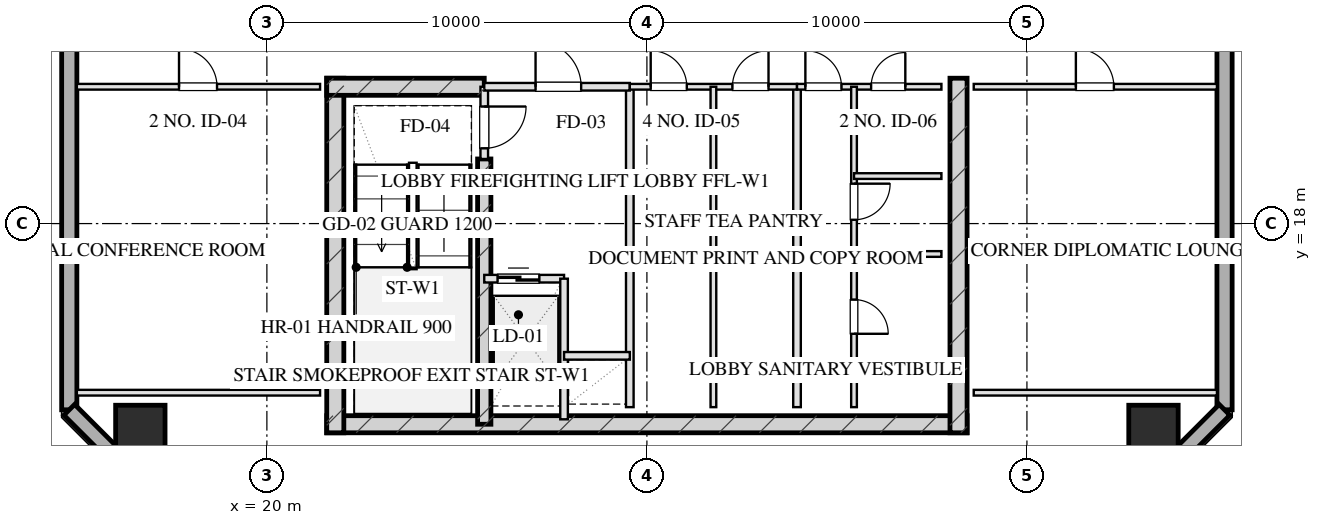
"""IFC4 building model, lengths in metres.
Left out: names, types, materials, properties, quantities, classifications, styles, units other than length and angle.
Written with IfcOpenShell. Run it as: python <this file> out.ifc"""

import sys

from ifc_helpers import new_model, si_unit, direction, frame, frame_2d, origin, origin_2d, place, context, subcontext, project, spatial, rectangle, hollow_rectangle, extrude, element, fill, save


model = new_model("IFC4")
c1 = context("Model", 3, precision=1e-05, world=origin(), true_north=direction((0.0, 1.0)))
c2 = subcontext(c1, "Body", "Model", "MODEL_VIEW")
j1 = project(units=[si_unit("LENGTHUNIT", "METRE"), si_unit("PLANEANGLEUNIT", "RADIAN")], contexts=[c1])
p1 = place(None, origin())
s1 = spatial("IfcSite", under=j1, at=p1, CompositionType="ELEMENT")
p2 = place(p1, origin())
s2 = spatial("IfcBuilding", under=s1, at=p2, CompositionType="ELEMENT")
p3 = place(p2, frame((0.0, 0.0, 240.8)))
s3 = spatial("IfcBuildingStorey", under=s2, at=p3, CompositionType="ELEMENT", Elevation=240.8)
p4 = place(p3, frame((21.575, 12.72, 0.0), z_axis=(0.0, 0.0, 1.0), x_axis=(1.0, 0.0, 0.0)))
e1 = element("IfcWall", 1, at=p4, inside=s3, PredefinedType="SHEAR", context=c2, shape_type="SweptSolid", body=[
    extrude(rectangle(XDim=16.85, YDim=0.45, at=frame_2d((8.425, 0.0))), origin(), (0.0, 0.0, 1.0), 3.2),
])
for number, where, z_axis, x_axis in (
    (2, (21.8, 21.825, 0.0), (0.0, 0.0, 1.0), (0.0, -1.0, 0.0)),
    (3, (38.2, 21.825, 0.0), (0.0, 0.0, 1.0), (0.0, -1.0, 0.0)),
):
    element("IfcWall", number, at=place(p3, frame(where, z_axis=z_axis, x_axis=x_axis)), inside=s3, PredefinedType="SHEAR", context=c2, shape_type="SweptSolid", body=[
        extrude(rectangle(XDim=9.33, YDim=0.45, at=frame_2d((4.665, 0.0))), origin(), (0.0, 0.0, 1.0), 3.2),
    ])
p5 = place(p3, frame((25.72, 19.7, 0.0), z_axis=(0.0, 0.0, 1.0), x_axis=(0.0, -1.0, 0.0)))
e4 = element("IfcWall", 4, at=p5, inside=s3, PredefinedType="SHEAR", context=c2, shape_type="SweptSolid", body=[
    extrude(rectangle(XDim=6.98, YDim=0.35, at=frame_2d((3.49, 0.0))), origin(), (0.0, 0.0, 1.0), 3.2),
])
p6 = place(p3, frame((21.575, 21.6, 0.0), z_axis=(0.0, 0.0, 1.0), x_axis=(1.0, 0.0, 0.0)))
e5 = element("IfcWall", 5, at=p6, inside=s3, PredefinedType="SHEAR", context=c2, shape_type="SweptSolid", body=[
    extrude(rectangle(XDim=4.145, YDim=0.45, at=frame_2d((2.073, 0.0))), origin(), (0.0, 0.0, 1.0), 3.2),
])
for number, where, z_axis, x_axis in (
    (6, (16.67, 12.57, 0.0), (0.0, 0.0, 1.0), (1.0, 0.0, 0.0)),
    (7, (43.33, 12.57, 0.0), (0.0, 0.0, 1.0), (1.0, 0.0, 0.0)),
):
    element("IfcColumn", number, at=place(p3, frame(where, z_axis=z_axis, x_axis=x_axis)), inside=s3, PredefinedType="COLUMN", context=c2, shape_type="SweptSolid", body=[
        extrude(hollow_rectangle(XDim=1.3, YDim=1.3, WallThickness=0.045, at=origin_2d()), origin(), (0.0, 0.0, 1.0), 3.201),
    ])
p7 = place(p3, frame((14.8, 13.1, 0.0), z_axis=(0.0, 0.0, 1.0), x_axis=(0.0, 1.0, 0.0)))
e8 = element("IfcWall", 8, at=p7, inside=s3, PredefinedType="SOLIDWALL", context=c2, shape_type="SweptSolid", body=[
    extrude(rectangle(XDim=41.8, YDim=0.4, at=frame_2d((20.9, 0.0))), origin(), (0.0, 0.0, 1.0), 2.36),
])
p8 = place(p7, frame((13.525, 0.0, 0.75)))
e9 = element("IfcOpeningElement", 9, at=p8, cuts=e8, PredefinedType="OPENING", context=c2, shape_type="SweptSolid", body=[
    extrude(rectangle(XDim=1.95, YDim=1.21, at=frame_2d((0.975, 0.605))), frame((0.0, 0.21, 0.0), z_axis=(0.0, -1.0, 0.0), x_axis=(1.0, 0.0, 0.0)), (0.0, 0.0, 1.0), 0.42),
])
p9 = place(p7, frame((17.325, 0.0, 0.75)))
e10 = element("IfcOpeningElement", 10, at=p9, cuts=e8, PredefinedType="OPENING", context=c2, shape_type="SweptSolid", body=[
    extrude(rectangle(XDim=1.95, YDim=1.21, at=frame_2d((0.975, 0.605))), frame((0.0, 0.21, 0.0), z_axis=(0.0, -1.0, 0.0), x_axis=(1.0, 0.0, 0.0)), (0.0, 0.0, 1.0), 0.42),
])
p10 = place(p7, frame((23.2, 0.0, 0.0)))
e11 = element("IfcOpeningElement", 11, at=p10, cuts=e8, PredefinedType="OPENING", context=c2, shape_type="SweptSolid", body=[
    extrude(rectangle(XDim=1.1, YDim=2.15, at=frame_2d((0.55, 1.075))), frame((0.0, 0.21, 0.0), z_axis=(0.0, -1.0, 0.0), x_axis=(1.0, 0.0, 0.0)), (0.0, 0.0, 1.0), 0.42),
])
p11 = place(p3, frame((45.2, 54.9, 0.0), z_axis=(0.0, 0.0, 1.0), x_axis=(0.0, -1.0, 0.0)))
e12 = element("IfcWall", 12, at=p11, inside=s3, PredefinedType="SOLIDWALL", context=c2, shape_type="SweptSolid", body=[
    extrude(rectangle(XDim=41.8, YDim=0.4, at=frame_2d((20.9, 0.0))), origin(), (0.0, 0.0, 1.0), 2.36),
])
p12 = place(p11, frame((26.325, 0.0, 0.75)))
e13 = element("IfcOpeningElement", 13, at=p12, cuts=e12, PredefinedType="OPENING", context=c2, shape_type="SweptSolid", body=[
    extrude(rectangle(XDim=1.95, YDim=1.21, at=frame_2d((0.975, 0.605))), frame((0.0, 0.21, 0.0), z_axis=(0.0, -1.0, 0.0), x_axis=(1.0, 0.0, 0.0)), (0.0, 0.0, 1.0), 0.42),
])
p13 = place(p11, frame((22.525, 0.0, 0.75)))
e14 = element("IfcOpeningElement", 14, at=p13, cuts=e12, PredefinedType="OPENING", context=c2, shape_type="SweptSolid", body=[
    extrude(rectangle(XDim=1.95, YDim=1.21, at=frame_2d((0.975, 0.605))), frame((0.0, 0.21, 0.0), z_axis=(0.0, -1.0, 0.0), x_axis=(1.0, 0.0, 0.0)), (0.0, 0.0, 1.0), 0.42),
])
p14 = place(p11, frame((17.5, 0.0, 0.0)))
e15 = element("IfcOpeningElement", 15, at=p14, cuts=e12, PredefinedType="OPENING", context=c2, shape_type="SweptSolid", body=[
    extrude(rectangle(XDim=1.1, YDim=2.15, at=frame_2d((0.55, 1.075))), frame((0.0, 0.21, 0.0), z_axis=(0.0, -1.0, 0.0), x_axis=(1.0, 0.0, 0.0)), (0.0, 0.0, 1.0), 0.42),
])
for number, where, z_axis, x_axis in (
    (16, (45.2, 13.1, 0.0), (0.0, 0.0, 1.0), (-0.707, -0.707, 0.0)),
    (17, (17.2, 10.7, 0.0), (0.0, 0.0, 1.0), (-0.707, 0.707, 0.0)),
):
    element("IfcWall", number, at=place(p3, frame(where, z_axis=z_axis, x_axis=x_axis)), inside=s3, PredefinedType="SOLIDWALL", context=c2, shape_type="SweptSolid", body=[
        extrude(rectangle(XDim=3.394, YDim=0.4, at=frame_2d((1.697, 0.0))), origin(), (0.0, 0.0, 1.0), 2.36),
    ])
p15 = place(p3, frame((25.72, 21.6, 0.0), z_axis=(0.0, 0.0, 1.0), x_axis=(0.0, -1.0, 0.0)))
e18 = element("IfcWall", 18, at=p15, inside=s3, PredefinedType="PARTITIONING", context=c2, shape_type="SweptSolid", body=[
    extrude(rectangle(XDim=1.9, YDim=0.2, at=frame_2d((0.95, 0.0))), origin(), (0.0, 0.0, 1.0), 2.925),
])
p16 = place(p15, frame((0.52, 0.0, 0.0)))
e19 = element("IfcOpeningElement", 19, at=p16, cuts=e18, PredefinedType="OPENING", context=c2, shape_type="SweptSolid", body=[
    extrude(rectangle(XDim=1.1, YDim=2.05, at=frame_2d((0.55, 1.025))), frame((0.0, 0.11, 0.0), z_axis=(0.0, -1.0, 0.0), x_axis=(1.0, 0.0, 0.0)), (0.0, 0.0, 1.0), 0.22),
])
p17 = place(p3, frame((29.55, 21.6, 0.0), z_axis=(0.0, 0.0, 1.0), x_axis=(0.0, -1.0, 0.0)))
e20 = element("IfcWall", 20, at=p17, inside=s3, PredefinedType="PARTITIONING", context=c2, shape_type="SweptSolid", body=[
    extrude(rectangle(XDim=8.43, YDim=0.2, at=frame_2d((4.215, 0.0))), origin(), (0.0, 0.0, 1.0), 2.925),
])
p18 = place(p3, frame((25.72, 21.6, 0.0), z_axis=(0.0, 0.0, 1.0), x_axis=(1.0, 0.0, 0.0)))
e21 = element("IfcWall", 21, at=p18, inside=s3, PredefinedType="PARTITIONING", context=c2, shape_type="SweptSolid", body=[
    extrude(rectangle(XDim=3.83, YDim=0.2, at=frame_2d((1.915, 0.0))), origin(), (0.0, 0.0, 1.0), 2.925),
])
p19 = place(p18, frame((1.35, 0.0, 0.0)))
e22 = element("IfcOpeningElement", 22, at=p19, cuts=e21, PredefinedType="OPENING", context=c2, shape_type="SweptSolid", body=[
    extrude(rectangle(XDim=1.2, YDim=2.05, at=frame_2d((0.6, 1.025))), frame((0.0, 0.11, 0.0), z_axis=(0.0, -1.0, 0.0), x_axis=(1.0, 0.0, 0.0)), (0.0, 0.0, 1.0), 0.22),
])
p20 = place(p3, frame((25.72, 16.55, 0.0), z_axis=(0.0, 0.0, 1.0), x_axis=(1.0, 0.0, 0.0)))
e23 = element("IfcWall", 23, at=p20, inside=s3, PredefinedType="PARTITIONING", context=c2, shape_type="SweptSolid", body=[
    extrude(rectangle(XDim=2.1, YDim=0.2, at=frame_2d((1.05, 0.0))), origin(), (0.0, 0.0, 1.0), 2.925),
])
p21 = place(p20, frame((0.35, 0.0, 0.0)))
e24 = element("IfcOpeningElement", 24, at=p21, cuts=e23, PredefinedType="OPENING", context=c2, shape_type="SweptSolid", body=[
    extrude(rectangle(XDim=1.1, YDim=2.05, at=frame_2d((0.55, 1.025))), frame((0.0, 0.11, 0.0), z_axis=(0.0, -1.0, 0.0), x_axis=(1.0, 0.0, 0.0)), (0.0, 0.0, 1.0), 0.22),
])
p22 = place(p3, frame((27.82, 16.55, 0.0), z_axis=(0.0, 0.0, 1.0), x_axis=(0.0, -1.0, 0.0)))
e25 = element("IfcWall", 25, at=p22, inside=s3, PredefinedType="PARTITIONING", context=c2, shape_type="SweptSolid", body=[
    extrude(rectangle(XDim=3.7, YDim=0.2, at=frame_2d((1.85, 0.0))), origin(), (0.0, 0.0, 1.0), 2.925),
])
p23 = place(p3, frame((27.82, 14.52, 0.0), z_axis=(0.0, 0.0, 1.0), x_axis=(1.0, 0.0, 0.0)))
e26 = element("IfcWall", 26, at=p23, inside=s3, PredefinedType="PARTITIONING", context=c2, shape_type="SweptSolid", body=[
    extrude(rectangle(XDim=1.73, YDim=0.2, at=frame_2d((0.865, 0.0))), origin(), (0.0, 0.0, 1.0), 2.925),
])
p24 = place(p3, frame((33.95, 21.6, 0.0), z_axis=(0.0, 0.0, 1.0), x_axis=(0.0, -1.0, 0.0)))
e27 = element("IfcWall", 27, at=p24, inside=s3, PredefinedType="PARTITIONING", context=c2, shape_type="SweptSolid", body=[
    extrude(rectangle(XDim=8.43, YDim=0.2, at=frame_2d((4.215, 0.0))), origin(), (0.0, 0.0, 1.0), 2.925),
])
p25 = place(p3, frame((29.55, 21.6, 0.0), z_axis=(0.0, 0.0, 1.0), x_axis=(1.0, 0.0, 0.0)))
e28 = element("IfcWall", 28, at=p25, inside=s3, PredefinedType="PARTITIONING", context=c2, shape_type="SweptSolid", body=[
    extrude(rectangle(XDim=4.4, YDim=0.15, at=frame_2d((2.2, 0.0))), origin(), (0.0, 0.0, 1.0), 2.925),
])
p26 = place(p25, frame((0.55, 0.0, 0.0)))
e29 = element("IfcOpeningElement", 29, at=p26, cuts=e28, PredefinedType="OPENING", context=c2, shape_type="SweptSolid", body=[
    extrude(rectangle(XDim=0.95, YDim=2.05, at=frame_2d((0.475, 1.025))), frame((0.0, 0.085, 0.0), z_axis=(0.0, -1.0, 0.0), x_axis=(1.0, 0.0, 0.0)), (0.0, 0.0, 1.0), 0.17),
])
p27 = place(p25, frame((2.7, 0.0, 0.0)))
e30 = element("IfcOpeningElement", 30, at=p27, cuts=e28, PredefinedType="OPENING", context=c2, shape_type="SweptSolid", body=[
    extrude(rectangle(XDim=0.95, YDim=2.05, at=frame_2d((0.475, 1.025))), frame((0.0, 0.085, 0.0), z_axis=(0.0, -1.0, 0.0), x_axis=(1.0, 0.0, 0.0)), (0.0, 0.0, 1.0), 0.17),
])
p28 = place(p3, frame((31.75, 21.6, 0.0), z_axis=(0.0, 0.0, 1.0), x_axis=(0.0, -1.0, 0.0)))
e31 = element("IfcWall", 31, at=p28, inside=s3, PredefinedType="PARTITIONING", context=c2, shape_type="SweptSolid", body=[
    extrude(rectangle(XDim=8.43, YDim=0.15, at=frame_2d((4.215, 0.0))), origin(), (0.0, 0.0, 1.0), 2.925),
])
p29 = place(p3, frame((33.95, 21.6, 0.0), z_axis=(0.0, 0.0, 1.0), x_axis=(1.0, 0.0, 0.0)))
e32 = element("IfcWall", 32, at=p29, inside=s3, PredefinedType="PARTITIONING", context=c2, shape_type="SweptSolid", body=[
    extrude(rectangle(XDim=3.8, YDim=0.15, at=frame_2d((1.9, 0.0))), origin(), (0.0, 0.0, 1.0), 2.925),
])
p30 = place(p29, frame((0.22, 0.0, 0.0)))
e33 = element("IfcOpeningElement", 33, at=p30, cuts=e32, PredefinedType="OPENING", context=c2, shape_type="SweptSolid", body=[
    extrude(rectangle(XDim=0.95, YDim=2.05, at=frame_2d((0.475, 1.025))), frame((0.0, 0.085, 0.0), z_axis=(0.0, -1.0, 0.0), x_axis=(1.0, 0.0, 0.0)), (0.0, 0.0, 1.0), 0.17),
])
p31 = place(p29, frame((1.95, 0.0, 0.0)))
e34 = element("IfcOpeningElement", 34, at=p31, cuts=e32, PredefinedType="OPENING", context=c2, shape_type="SweptSolid", body=[
    extrude(rectangle(XDim=0.9, YDim=2.05, at=frame_2d((0.45, 1.025))), frame((0.0, 0.085, 0.0), z_axis=(0.0, -1.0, 0.0), x_axis=(1.0, 0.0, 0.0)), (0.0, 0.0, 1.0), 0.17),
])
p32 = place(p3, frame((35.45, 21.6, 0.0), z_axis=(0.0, 0.0, 1.0), x_axis=(0.0, -1.0, 0.0)))
e35 = element("IfcWall", 35, at=p32, inside=s3, PredefinedType="PARTITIONING", context=c2, shape_type="SweptSolid", body=[
    extrude(rectangle(XDim=8.43, YDim=0.15, at=frame_2d((4.215, 0.0))), origin(), (0.0, 0.0, 1.0), 2.565),
])
p33 = place(p32, frame((2.55, 0.0, 0.0)))
e36 = element("IfcOpeningElement", 36, at=p33, cuts=e35, PredefinedType="OPENING", context=c2, shape_type="SweptSolid", body=[
    extrude(rectangle(XDim=0.95, YDim=2.05, at=frame_2d((0.475, 1.025))), frame((0.0, 0.085, 0.0), z_axis=(0.0, -1.0, 0.0), x_axis=(1.0, 0.0, 0.0)), (0.0, 0.0, 1.0), 0.17),
])
p34 = place(p32, frame((5.6, 0.0, 0.0)))
e37 = element("IfcOpeningElement", 37, at=p34, cuts=e35, PredefinedType="OPENING", context=c2, shape_type="SweptSolid", body=[
    extrude(rectangle(XDim=0.9, YDim=2.05, at=frame_2d((0.45, 1.025))), frame((0.0, 0.085, 0.0), z_axis=(0.0, -1.0, 0.0), x_axis=(1.0, 0.0, 0.0)), (0.0, 0.0, 1.0), 0.17),
])
for number, where, z_axis, x_axis in (
    (38, (35.45, 17.2, 0.0), (0.0, 0.0, 1.0), (1.0, 0.0, 0.0)),
    (39, (35.45, 19.25, 0.0), (0.0, 0.0, 1.0), (1.0, 0.0, 0.0)),
):
    element("IfcWall", number, at=place(p3, frame(where, z_axis=z_axis, x_axis=x_axis)), inside=s3, PredefinedType="PARTITIONING", context=c2, shape_type="SweptSolid", body=[
        extrude(rectangle(XDim=2.3, YDim=0.15, at=frame_2d((1.15, 0.0))), origin(), (0.0, 0.0, 1.0), 2.925),
    ])
p35 = place(p3, frame((15.0, 13.55, 0.0), z_axis=(0.0, 0.0, 1.0), x_axis=(1.0, 0.0, 0.0)))
e40 = element("IfcWall", 40, at=p35, inside=s3, PredefinedType="PARTITIONING", context=c2, shape_type="SweptSolid", body=[
    extrude(rectangle(XDim=6.4, YDim=0.15, at=frame_2d((3.2, 0.0))), origin(), (0.0, 0.0, 1.0), 2.925),
])
p36 = place(p3, frame((15.0, 21.6, 0.0), z_axis=(0.0, 0.0, 1.0), x_axis=(1.0, 0.0, 0.0)))
e41 = element("IfcWall", 41, at=p36, inside=s3, PredefinedType="PARTITIONING", context=c2, shape_type="SweptSolid", body=[
    extrude(rectangle(XDim=6.4, YDim=0.15, at=frame_2d((3.2, 0.0))), origin(), (0.0, 0.0, 1.0), 2.925),
])
p37 = place(p36, frame((2.688, 0.0, 0.0)))
e42 = element("IfcOpeningElement", 42, at=p37, cuts=e41, PredefinedType="OPENING", context=c2, shape_type="SweptSolid", body=[
    extrude(rectangle(XDim=1.0, YDim=2.05, at=frame_2d((0.5, 1.025))), frame((0.0, 0.085, 0.0), z_axis=(0.0, -1.0, 0.0), x_axis=(1.0, 0.0, 0.0)), (0.0, 0.0, 1.0), 0.17),
])
p38 = place(p3, frame((38.6, 13.55, 0.0), z_axis=(0.0, 0.0, 1.0), x_axis=(1.0, 0.0, 0.0)))
e43 = element("IfcWall", 43, at=p38, inside=s3, PredefinedType="PARTITIONING", context=c2, shape_type="SweptSolid", body=[
    extrude(rectangle(XDim=6.4, YDim=0.15, at=frame_2d((3.2, 0.0))), origin(), (0.0, 0.0, 1.0), 2.925),
])
p39 = place(p3, frame((38.6, 21.6, 0.0), z_axis=(0.0, 0.0, 1.0), x_axis=(1.0, 0.0, 0.0)))
e44 = element("IfcWall", 44, at=p39, inside=s3, PredefinedType="PARTITIONING", context=c2, shape_type="SweptSolid", body=[
    extrude(rectangle(XDim=6.4, YDim=0.15, at=frame_2d((3.2, 0.0))), origin(), (0.0, 0.0, 1.0), 2.925),
])
p40 = place(p39, frame((2.688, 0.0, 0.0)))
e45 = element("IfcOpeningElement", 45, at=p40, cuts=e44, PredefinedType="OPENING", context=c2, shape_type="SweptSolid", body=[
    extrude(rectangle(XDim=1.0, YDim=2.05, at=frame_2d((0.5, 1.025))), frame((0.0, 0.085, 0.0), z_axis=(0.0, -1.0, 0.0), x_axis=(1.0, 0.0, 0.0)), (0.0, 0.0, 1.0), 0.17),
])
p41 = place(p16, origin())
e46 = element("IfcDoor", 46, at=p41, inside=s3, OperationType="SINGLE_SWING_LEFT", PredefinedType="DOOR", context=c2, shape_type="SweptSolid", body=[
    extrude(rectangle(XDim=1.1, YDim=2.05, at=frame_2d((0.55, 1.025))), frame((0.0, 0.025, 0.0), z_axis=(0.0, -1.0, 0.0), x_axis=(1.0, 0.0, 0.0)), (0.0, 0.0, 1.0), 0.05),
])
fill(e19, e46)
p42 = place(p19, origin())
e47 = element("IfcDoor", 47, at=p42, inside=s3, OperationType="SINGLE_SWING_LEFT", PredefinedType="DOOR", context=c2, shape_type="SweptSolid", body=[
    extrude(rectangle(XDim=1.2, YDim=2.05, at=frame_2d((0.6, 1.025))), frame((0.0, 0.025, 0.0), z_axis=(0.0, -1.0, 0.0), x_axis=(1.0, 0.0, 0.0)), (0.0, 0.0, 1.0), 0.05),
])
fill(e22, e47)
p43 = place(p21, origin())
e48 = element("IfcDoor", 48, at=p43, inside=s3, OperationType="DOUBLE_DOOR_SLIDING", PredefinedType="DOOR", context=c2, shape_type="SweptSolid", body=[
    extrude(rectangle(XDim=1.1, YDim=2.05, at=frame_2d((0.55, 1.025))), frame((0.0, 0.025, 0.0), z_axis=(0.0, -1.0, 0.0), x_axis=(1.0, 0.0, 0.0)), (0.0, 0.0, 1.0), 0.05),
])
fill(e24, e48)
p44 = place(p26, origin())
e49 = element("IfcDoor", 49, at=p44, inside=s3, OperationType="SINGLE_SWING_LEFT", PredefinedType="DOOR", context=c2, shape_type="SweptSolid", body=[
    extrude(rectangle(XDim=0.95, YDim=2.05, at=frame_2d((0.475, 1.025))), frame((0.0, 0.025, 0.0), z_axis=(0.0, -1.0, 0.0), x_axis=(1.0, 0.0, 0.0)), (0.0, 0.0, 1.0), 0.05),
])
fill(e29, e49)
p45 = place(p27, origin())
e50 = element("IfcDoor", 50, at=p45, inside=s3, OperationType="SINGLE_SWING_RIGHT", PredefinedType="DOOR", context=c2, shape_type="SweptSolid", body=[
    extrude(rectangle(XDim=0.95, YDim=2.05, at=frame_2d((0.475, 1.025))), frame((0.0, 0.025, 0.0), z_axis=(0.0, -1.0, 0.0), x_axis=(1.0, 0.0, 0.0)), (0.0, 0.0, 1.0), 0.05),
])
fill(e30, e50)
p46 = place(p30, origin())
e51 = element("IfcDoor", 51, at=p46, inside=s3, OperationType="SINGLE_SWING_LEFT", PredefinedType="DOOR", context=c2, shape_type="SweptSolid", body=[
    extrude(rectangle(XDim=0.95, YDim=2.05, at=frame_2d((0.475, 1.025))), frame((0.0, 0.025, 0.0), z_axis=(0.0, -1.0, 0.0), x_axis=(1.0, 0.0, 0.0)), (0.0, 0.0, 1.0), 0.05),
])
fill(e33, e51)
p47 = place(p31, origin())
e52 = element("IfcDoor", 52, at=p47, inside=s3, OperationType="SINGLE_SWING_RIGHT", PredefinedType="DOOR", context=c2, shape_type="SweptSolid", body=[
    extrude(rectangle(XDim=0.9, YDim=2.05, at=frame_2d((0.45, 1.025))), frame((0.0, 0.025, 0.0), z_axis=(0.0, -1.0, 0.0), x_axis=(1.0, 0.0, 0.0)), (0.0, 0.0, 1.0), 0.05),
])
fill(e34, e52)
p48 = place(p33, origin())
e53 = element("IfcDoor", 53, at=p48, inside=s3, OperationType="SINGLE_SWING_LEFT", PredefinedType="DOOR", context=c2, shape_type="SweptSolid", body=[
    extrude(rectangle(XDim=0.95, YDim=2.05, at=frame_2d((0.475, 1.025))), frame((0.0, 0.025, 0.0), z_axis=(0.0, -1.0, 0.0), x_axis=(1.0, 0.0, 0.0)), (0.0, 0.0, 1.0), 0.05),
])
fill(e36, e53)
p49 = place(p34, origin())
e54 = element("IfcDoor", 54, at=p49, inside=s3, OperationType="SINGLE_SWING_RIGHT", PredefinedType="DOOR", context=c2, shape_type="SweptSolid", body=[
    extrude(rectangle(XDim=0.9, YDim=2.05, at=frame_2d((0.45, 1.025))), frame((0.0, 0.025, 0.0), z_axis=(0.0, -1.0, 0.0), x_axis=(1.0, 0.0, 0.0)), (0.0, 0.0, 1.0), 0.05),
])
fill(e37, e54)
p50 = place(p37, origin())
e55 = element("IfcDoor", 55, at=p50, inside=s3, OperationType="SINGLE_SWING_LEFT", PredefinedType="DOOR", context=c2, shape_type="SweptSolid", body=[
    extrude(rectangle(XDim=1.0, YDim=2.05, at=frame_2d((0.5, 1.025))), frame((0.0, 0.025, 0.0), z_axis=(0.0, -1.0, 0.0), x_axis=(1.0, 0.0, 0.0)), (0.0, 0.0, 1.0), 0.05),
])
fill(e42, e55)
p51 = place(p40, origin())
e56 = element("IfcDoor", 56, at=p51, inside=s3, OperationType="SINGLE_SWING_LEFT", PredefinedType="DOOR", context=c2, shape_type="SweptSolid", body=[
    extrude(rectangle(XDim=1.0, YDim=2.05, at=frame_2d((0.5, 1.025))), frame((0.0, 0.025, 0.0), z_axis=(0.0, -1.0, 0.0), x_axis=(1.0, 0.0, 0.0)), (0.0, 0.0, 1.0), 0.05),
])
fill(e45, e56)
save(model, sys.argv[1])
